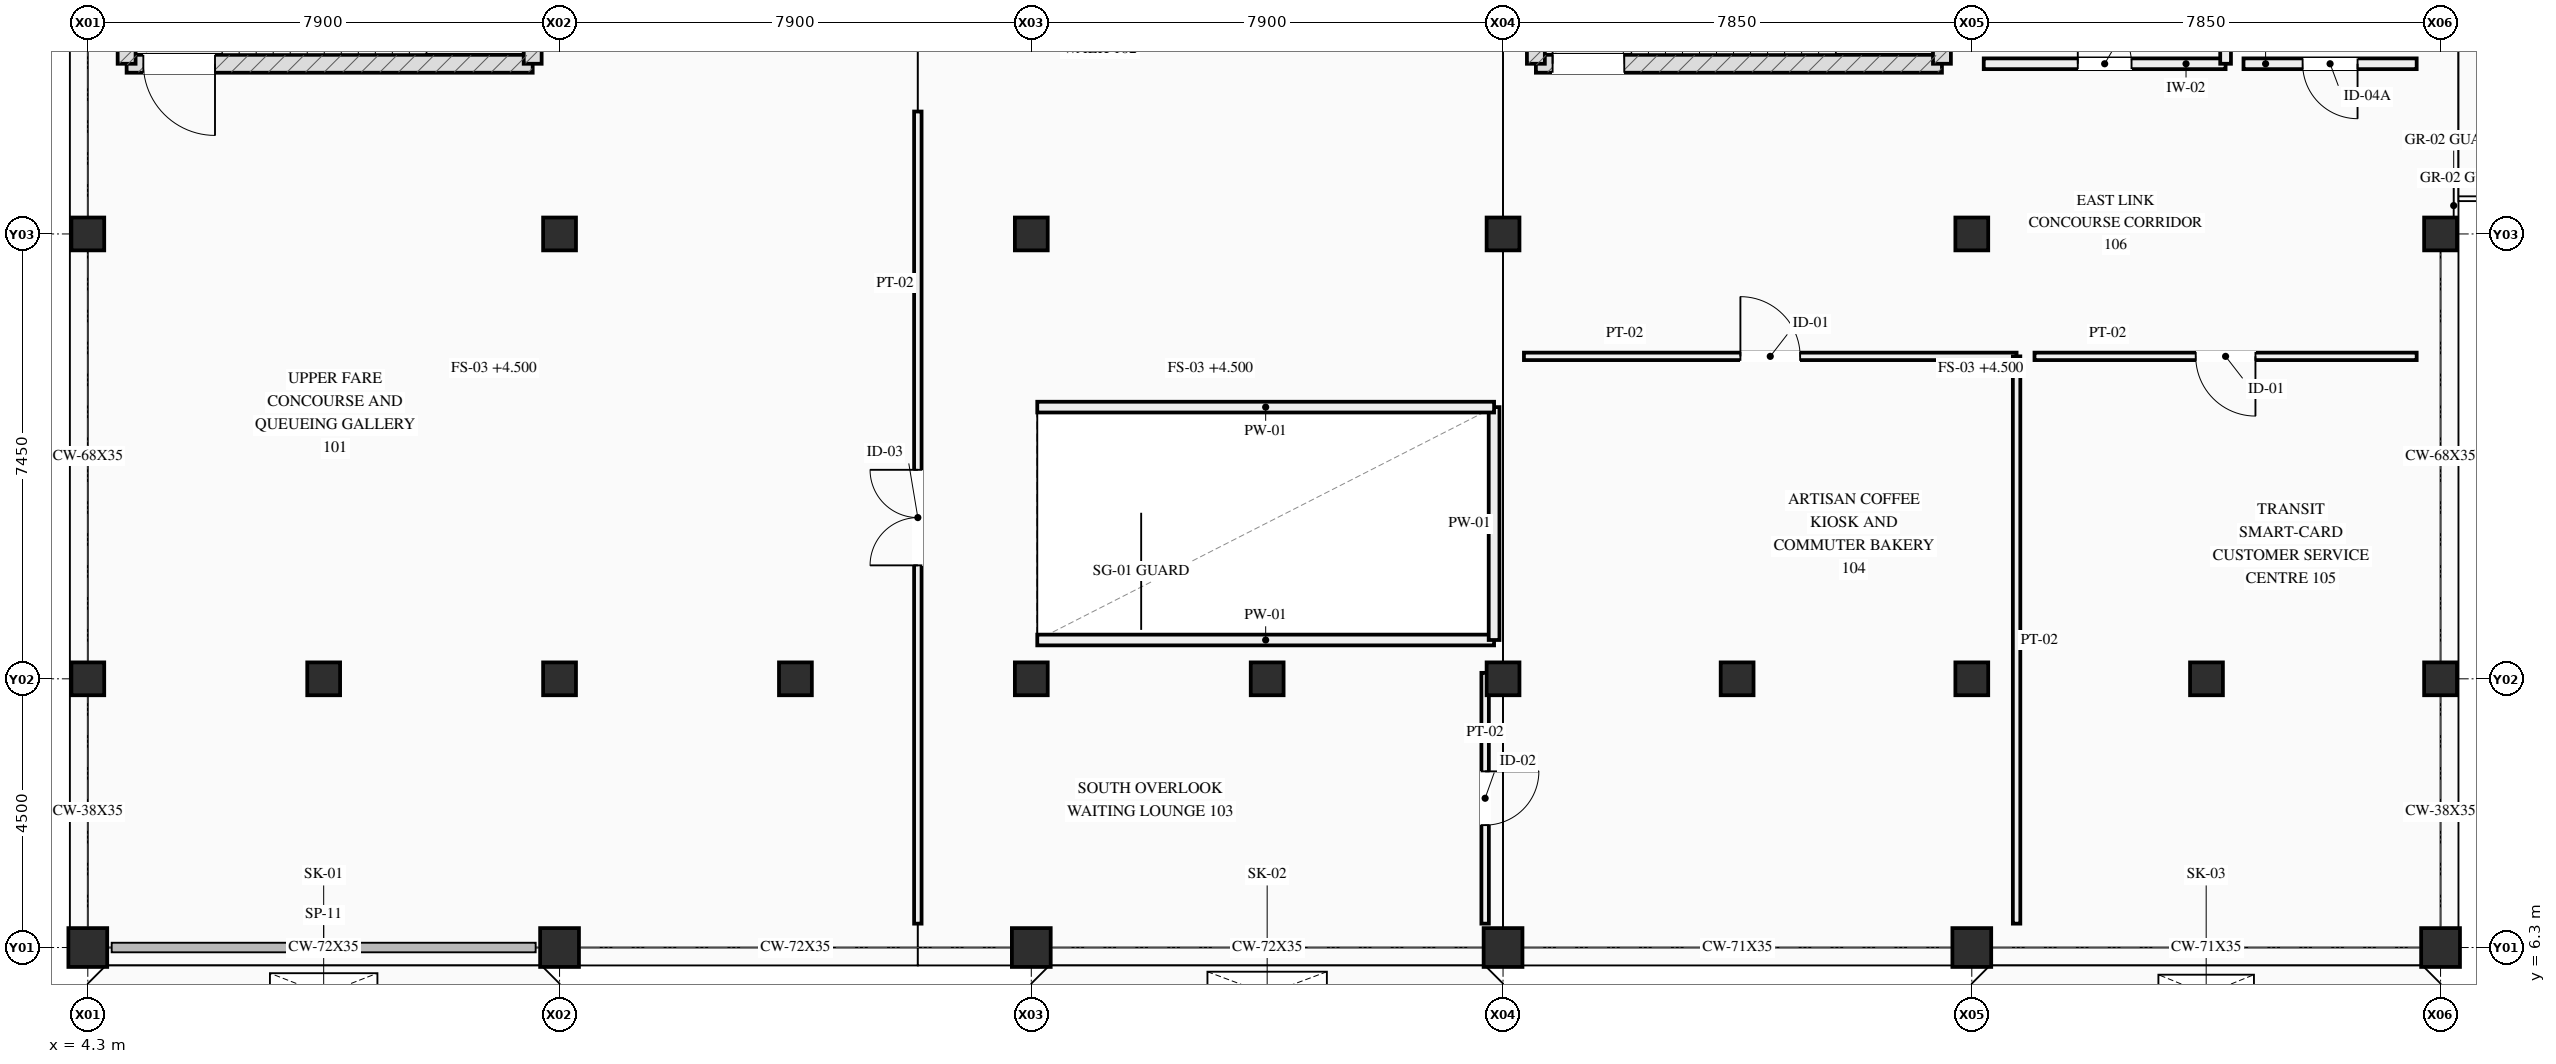
"""IFC4 building model, lengths in metres.
Left out: names, types, materials, properties, quantities, classifications, styles, units other than length and angle.
Written with IfcOpenShell. Run it as: python <this file> out.ifc"""

import sys

from ifc_helpers import new_model, si_unit, direction, frame, frame_2d, origin, origin_2d, place, context, subcontext, project, spatial, rectangle, circle, extrude, element, fill, save


model = new_model("IFC4")
c1 = context("Model", 3, precision=1e-05, world=origin(), true_north=direction((0.0, 1.0)))
c2 = subcontext(c1, "Body", "Model", "MODEL_VIEW")
j1 = project(units=[si_unit("LENGTHUNIT", "METRE"), si_unit("PLANEANGLEUNIT", "RADIAN")], contexts=[c1])
p1 = place(None, origin())
s1 = spatial("IfcSite", under=j1, at=p1, CompositionType="ELEMENT")
p2 = place(p1, origin())
s2 = spatial("IfcBuilding", under=s1, at=p2, CompositionType="ELEMENT")
p3 = place(p2, frame((0.0, 0.0, 4.5)))
s3 = spatial("IfcBuildingStorey", under=s2, at=p3, CompositionType="ELEMENT", Elevation=4.5)
p4 = place(p3, frame((4.3, 6.3, 0.0), z_axis=(0.0, 0.0, 1.0), x_axis=(1.0, 0.0, 0.0)))
e1 = element("IfcColumn", 1, at=p4, inside=s3, PredefinedType="COLUMN", context=c2, shape_type="SweptSolid", body=[
    extrude(circle(Radius=0.325, at=origin_2d()), origin(), (0.0, 0.0, 1.0), 4.5),
])
for number, where, z_axis, x_axis in (
    (2, (4.3, 10.8, 0.0), (0.0, 0.0, 1.0), (1.0, 0.0, 0.0)),
    (3, (4.3, 18.25, 0.0), (0.0, 0.0, 1.0), (1.0, 0.0, 0.0)),
):
    element("IfcColumn", number, at=place(p3, frame(where, z_axis=z_axis, x_axis=x_axis)), inside=s3, PredefinedType="COLUMN", context=c2, shape_type="SweptSolid", body=[
        extrude(rectangle(XDim=0.55, YDim=0.55, at=origin_2d()), origin(), (0.0, 0.0, 1.0), 4.5),
    ])
p5 = place(p3, frame((12.2, 6.3, 0.0), z_axis=(0.0, 0.0, 1.0), x_axis=(1.0, 0.0, 0.0)))
e4 = element("IfcColumn", 4, at=p5, inside=s3, PredefinedType="COLUMN", context=c2, shape_type="SweptSolid", body=[
    extrude(circle(Radius=0.325, at=origin_2d()), origin(), (0.0, 0.0, 1.0), 4.5),
])
for number, where, z_axis, x_axis in (
    (5, (12.2, 10.8, 0.0), (0.0, 0.0, 1.0), (1.0, 0.0, 0.0)),
    (6, (12.2, 18.25, 0.0), (0.0, 0.0, 1.0), (1.0, 0.0, 0.0)),
):
    element("IfcColumn", number, at=place(p3, frame(where, z_axis=z_axis, x_axis=x_axis)), inside=s3, PredefinedType="COLUMN", context=c2, shape_type="SweptSolid", body=[
        extrude(rectangle(XDim=0.55, YDim=0.55, at=origin_2d()), origin(), (0.0, 0.0, 1.0), 4.5),
    ])
p6 = place(p3, frame((20.1, 6.3, 0.0), z_axis=(0.0, 0.0, 1.0), x_axis=(1.0, 0.0, 0.0)))
e7 = element("IfcColumn", 7, at=p6, inside=s3, PredefinedType="COLUMN", context=c2, shape_type="SweptSolid", body=[
    extrude(circle(Radius=0.325, at=origin_2d()), origin(), (0.0, 0.0, 1.0), 4.5),
])
for number, where, z_axis, x_axis in (
    (8, (20.1, 10.8, 0.0), (0.0, 0.0, 1.0), (1.0, 0.0, 0.0)),
    (9, (20.1, 18.25, 0.0), (0.0, 0.0, 1.0), (1.0, 0.0, 0.0)),
):
    element("IfcColumn", number, at=place(p3, frame(where, z_axis=z_axis, x_axis=x_axis)), inside=s3, PredefinedType="COLUMN", context=c2, shape_type="SweptSolid", body=[
        extrude(rectangle(XDim=0.55, YDim=0.55, at=origin_2d()), origin(), (0.0, 0.0, 1.0), 4.5),
    ])
p7 = place(p3, frame((28.0, 6.3, 0.0), z_axis=(0.0, 0.0, 1.0), x_axis=(1.0, 0.0, 0.0)))
e10 = element("IfcColumn", 10, at=p7, inside=s3, PredefinedType="COLUMN", context=c2, shape_type="SweptSolid", body=[
    extrude(circle(Radius=0.325, at=origin_2d()), origin(), (0.0, 0.0, 1.0), 4.5),
])
for number, where, z_axis, x_axis in (
    (11, (28.0, 10.8, 0.0), (0.0, 0.0, 1.0), (1.0, 0.0, 0.0)),
    (12, (28.0, 18.25, 0.0), (0.0, 0.0, 1.0), (1.0, 0.0, 0.0)),
):
    element("IfcColumn", number, at=place(p3, frame(where, z_axis=z_axis, x_axis=x_axis)), inside=s3, PredefinedType="COLUMN", context=c2, shape_type="SweptSolid", body=[
        extrude(rectangle(XDim=0.55, YDim=0.55, at=origin_2d()), origin(), (0.0, 0.0, 1.0), 4.5),
    ])
p8 = place(p3, frame((35.85, 6.3, 0.0), z_axis=(0.0, 0.0, 1.0), x_axis=(1.0, 0.0, 0.0)))
e13 = element("IfcColumn", 13, at=p8, inside=s3, PredefinedType="COLUMN", context=c2, shape_type="SweptSolid", body=[
    extrude(circle(Radius=0.325, at=origin_2d()), origin(), (0.0, 0.0, 1.0), 4.5),
])
for number, where, z_axis, x_axis in (
    (14, (35.85, 10.8, 0.0), (0.0, 0.0, 1.0), (1.0, 0.0, 0.0)),
    (15, (35.85, 18.25, 0.0), (0.0, 0.0, 1.0), (1.0, 0.0, 0.0)),
):
    element("IfcColumn", number, at=place(p3, frame(where, z_axis=z_axis, x_axis=x_axis)), inside=s3, PredefinedType="COLUMN", context=c2, shape_type="SweptSolid", body=[
        extrude(rectangle(XDim=0.55, YDim=0.55, at=origin_2d()), origin(), (0.0, 0.0, 1.0), 4.5),
    ])
p9 = place(p3, frame((43.7, 6.3, 0.0), z_axis=(0.0, 0.0, 1.0), x_axis=(1.0, 0.0, 0.0)))
e16 = element("IfcColumn", 16, at=p9, inside=s3, PredefinedType="COLUMN", context=c2, shape_type="SweptSolid", body=[
    extrude(circle(Radius=0.325, at=origin_2d()), origin(), (0.0, 0.0, 1.0), 4.5),
])
for number, where, z_axis, x_axis in (
    (17, (43.7, 10.8, 0.0), (0.0, 0.0, 1.0), (1.0, 0.0, 0.0)),
    (18, (43.7, 18.25, 0.0), (0.0, 0.0, 1.0), (1.0, 0.0, 0.0)),
):
    element("IfcColumn", number, at=place(p3, frame(where, z_axis=z_axis, x_axis=x_axis)), inside=s3, PredefinedType="COLUMN", context=c2, shape_type="SweptSolid", body=[
        extrude(rectangle(XDim=0.55, YDim=0.55, at=origin_2d()), origin(), (0.0, 0.0, 1.0), 4.5),
    ])
for number, where, z_axis, x_axis in (
    (19, (8.25, 10.8, 0.0), (0.0, 0.0, 1.0), (1.0, 0.0, 0.0)),
    (20, (16.15, 10.8, 0.0), (0.0, 0.0, 1.0), (1.0, 0.0, 0.0)),
    (21, (24.05, 10.8, 0.0), (0.0, 0.0, 1.0), (1.0, 0.0, 0.0)),
    (22, (31.92, 10.8, 0.0), (0.0, 0.0, 1.0), (1.0, 0.0, 0.0)),
    (23, (39.78, 10.8, 0.0), (0.0, 0.0, 1.0), (1.0, 0.0, 0.0)),
):
    element("IfcColumn", number, at=place(p3, frame(where, z_axis=z_axis, x_axis=x_axis)), inside=s3, PredefinedType="PILASTER", context=c2, shape_type="SweptSolid", body=[
        extrude(circle(Radius=0.275, at=origin_2d()), origin(), (0.0, 0.0, 1.0), 4.5),
    ])
p10 = place(p3, frame((4.95, 21.1, 0.0), z_axis=(0.0, 0.0, 1.0), x_axis=(1.0, 0.0, 0.0)))
e24 = element("IfcWall", 24, at=p10, inside=s3, PredefinedType="SHEAR", context=c2, shape_type="SweptSolid", body=[
    extrude(rectangle(XDim=6.8, YDim=0.3, at=frame_2d((3.4, 0.0))), origin(), (0.0, 0.0, 1.0), 4.25),
])
p11 = place(p10, frame((0.28, 0.0, 0.0)))
e25 = element("IfcOpeningElement", 25, at=p11, cuts=e24, PredefinedType="OPENING", context=c2, shape_type="SweptSolid", body=[
    extrude(rectangle(XDim=1.2, YDim=2.2, at=frame_2d((0.6, 1.1))), frame((0.0, 0.16, 0.0), z_axis=(0.0, -1.0, 0.0), x_axis=(1.0, 0.0, 0.0)), (0.0, 0.0, 1.0), 0.32),
])
for number, where, z_axis, x_axis in (
    (26, (4.95, 24.75, 0.0), (0.0, 0.0, 1.0), (0.0, -1.0, 0.0)),
    (27, (11.75, 21.1, 0.0), (0.0, 0.0, 1.0), (0.0, 1.0, 0.0)),
):
    element("IfcWall", number, at=place(p3, frame(where, z_axis=z_axis, x_axis=x_axis)), inside=s3, PredefinedType="SHEAR", context=c2, shape_type="SweptSolid", body=[
        extrude(rectangle(XDim=3.65, YDim=0.3, at=frame_2d((1.825, 0.0))), origin(), (0.0, 0.0, 1.0), 4.25),
    ])
p12 = place(p3, frame((28.55, 21.1, 0.0), z_axis=(0.0, 0.0, 1.0), x_axis=(1.0, 0.0, 0.0)))
e28 = element("IfcWall", 28, at=p12, inside=s3, PredefinedType="SHEAR", context=c2, shape_type="SweptSolid", body=[
    extrude(rectangle(XDim=6.8, YDim=0.3, at=frame_2d((3.4, 0.0))), origin(), (0.0, 0.0, 1.0), 4.25),
])
p13 = place(p12, frame((0.28, 0.0, 0.0)))
e29 = element("IfcOpeningElement", 29, at=p13, cuts=e28, PredefinedType="OPENING", context=c2, shape_type="SweptSolid", body=[
    extrude(rectangle(XDim=1.2, YDim=2.2, at=frame_2d((0.6, 1.1))), frame((0.0, 0.16, 0.0), z_axis=(0.0, -1.0, 0.0), x_axis=(1.0, 0.0, 0.0)), (0.0, 0.0, 1.0), 0.32),
])
for number, where, z_axis, x_axis in (
    (30, (28.55, 24.75, 0.0), (0.0, 0.0, 1.0), (0.0, -1.0, 0.0)),
    (31, (35.35, 21.1, 0.0), (0.0, 0.0, 1.0), (0.0, 1.0, 0.0)),
):
    element("IfcWall", number, at=place(p3, frame(where, z_axis=z_axis, x_axis=x_axis)), inside=s3, PredefinedType="SHEAR", context=c2, shape_type="SweptSolid", body=[
        extrude(rectangle(XDim=3.65, YDim=0.3, at=frame_2d((1.825, 0.0))), origin(), (0.0, 0.0, 1.0), 4.25),
    ])
p14 = place(p3, frame((20.2, 11.45, 0.0), z_axis=(0.0, 0.0, 1.0), x_axis=(1.0, 0.0, 0.0)))
e32 = element("IfcWall", 32, at=p14, inside=s3, PredefinedType="PARAPET", context=c2, shape_type="SweptSolid", body=[
    extrude(rectangle(XDim=7.65, YDim=0.18, at=frame_2d((3.825, 0.0))), origin(), (0.0, 0.0, 1.0), 1.2),
])
p15 = place(p3, frame((27.85, 11.45, 0.0), z_axis=(0.0, 0.0, 1.0), x_axis=(0.0, 1.0, 0.0)))
e33 = element("IfcWall", 33, at=p15, inside=s3, PredefinedType="PARAPET", context=c2, shape_type="SweptSolid", body=[
    extrude(rectangle(XDim=3.9, YDim=0.18, at=frame_2d((1.95, 0.0))), origin(), (0.0, 0.0, 1.0), 1.2),
])
p16 = place(p3, frame((20.2, 15.35, 0.0), z_axis=(0.0, 0.0, 1.0), x_axis=(1.0, 0.0, 0.0)))
e34 = element("IfcWall", 34, at=p16, inside=s3, PredefinedType="PARAPET", context=c2, shape_type="SweptSolid", body=[
    extrude(rectangle(XDim=7.65, YDim=0.18, at=frame_2d((3.825, 0.0))), origin(), (0.0, 0.0, 1.0), 1.2),
])
p17 = place(p3, frame((18.2, 6.7, 0.0), z_axis=(0.0, 0.0, 1.0), x_axis=(0.0, 1.0, 0.0)))
e35 = element("IfcWall", 35, at=p17, inside=s3, PredefinedType="PARTITIONING", context=c2, shape_type="SweptSolid", body=[
    extrude(rectangle(XDim=13.6, YDim=0.125, at=frame_2d((6.8, 0.0))), origin(), (0.0, 0.0, 1.0), 3.3),
])
p18 = place(p17, frame((6.0, 0.0, 0.0)))
e36 = element("IfcOpeningElement", 36, at=p18, cuts=e35, PredefinedType="OPENING", context=c2, shape_type="SweptSolid", body=[
    extrude(rectangle(XDim=1.6, YDim=2.2, at=frame_2d((0.8, 1.1))), frame((0.0, 0.073, 0.0), z_axis=(0.0, -1.0, 0.0), x_axis=(1.0, 0.0, 0.0)), (0.0, 0.0, 1.0), 0.145),
])
p19 = place(p3, frame((27.7, 6.7, 0.0), z_axis=(0.0, 0.0, 1.0), x_axis=(0.0, 1.0, 0.0)))
e37 = element("IfcWall", 37, at=p19, inside=s3, PredefinedType="PARTITIONING", context=c2, shape_type="SweptSolid", body=[
    extrude(rectangle(XDim=4.2, YDim=0.125, at=frame_2d((2.1, 0.0))), origin(), (0.0, 0.0, 1.0), 3.3),
])
p20 = place(p19, frame((1.65, 0.0, 0.0)))
e38 = element("IfcOpeningElement", 38, at=p20, cuts=e37, PredefinedType="OPENING", context=c2, shape_type="SweptSolid", body=[
    extrude(rectangle(XDim=0.9, YDim=2.15, at=frame_2d((0.45, 1.075))), frame((0.0, 0.073, 0.0), z_axis=(0.0, -1.0, 0.0), x_axis=(1.0, 0.0, 0.0)), (0.0, 0.0, 1.0), 0.145),
])
p21 = place(p3, frame((28.35, 16.2, 0.0), z_axis=(0.0, 0.0, 1.0), x_axis=(1.0, 0.0, 0.0)))
e39 = element("IfcWall", 39, at=p21, inside=s3, PredefinedType="PARTITIONING", context=c2, shape_type="SweptSolid", body=[
    extrude(rectangle(XDim=8.25, YDim=0.125, at=frame_2d((4.125, 0.0))), origin(), (0.0, 0.0, 1.0), 3.3),
])
p22 = place(p21, frame((3.625, 0.0, 0.0)))
e40 = element("IfcOpeningElement", 40, at=p22, cuts=e39, PredefinedType="OPENING", context=c2, shape_type="SweptSolid", body=[
    extrude(rectangle(XDim=1.0, YDim=2.15, at=frame_2d((0.5, 1.075))), frame((0.0, 0.073, 0.0), z_axis=(0.0, -1.0, 0.0), x_axis=(1.0, 0.0, 0.0)), (0.0, 0.0, 1.0), 0.145),
])
p23 = place(p3, frame((36.6, 6.7, 0.0), z_axis=(0.0, 0.0, 1.0), x_axis=(0.0, 1.0, 0.0)))
e41 = element("IfcWall", 41, at=p23, inside=s3, PredefinedType="PARTITIONING", context=c2, shape_type="SweptSolid", body=[
    extrude(rectangle(XDim=9.5, YDim=0.125, at=frame_2d((4.75, 0.0))), origin(), (0.0, 0.0, 1.0), 3.3),
])
p24 = place(p3, frame((36.9, 16.2, 0.0), z_axis=(0.0, 0.0, 1.0), x_axis=(1.0, 0.0, 0.0)))
e42 = element("IfcWall", 42, at=p24, inside=s3, PredefinedType="PARTITIONING", context=c2, shape_type="SweptSolid", body=[
    extrude(rectangle(XDim=6.4, YDim=0.125, at=frame_2d((3.2, 0.0))), origin(), (0.0, 0.0, 1.0), 3.3),
])
p25 = place(p24, frame((2.7, 0.0, 0.0)))
e43 = element("IfcOpeningElement", 43, at=p25, cuts=e42, PredefinedType="OPENING", context=c2, shape_type="SweptSolid", body=[
    extrude(rectangle(XDim=1.0, YDim=2.15, at=frame_2d((0.5, 1.075))), frame((0.0, 0.073, 0.0), z_axis=(0.0, -1.0, 0.0), x_axis=(1.0, 0.0, 0.0)), (0.0, 0.0, 1.0), 0.145),
])
p26 = place(p3, frame((36.05, 21.1, 0.0), z_axis=(0.0, 0.0, 1.0), x_axis=(1.0, 0.0, 0.0)))
e44 = element("IfcWall", 44, at=p26, inside=s3, PredefinedType="PLUMBINGWALL", context=c2, shape_type="SweptSolid", body=[
    extrude(rectangle(XDim=4.05, YDim=0.18, at=frame_2d((2.025, 0.0))), origin(), (0.0, 0.0, 1.0), 3.3),
])
p27 = place(p26, frame((1.575, 0.0, 0.0)))
e45 = element("IfcOpeningElement", 45, at=p27, cuts=e44, PredefinedType="OPENING", context=c2, shape_type="SweptSolid", body=[
    extrude(rectangle(XDim=0.9, YDim=2.1, at=frame_2d((0.45, 1.05))), frame((0.0, 0.1, 0.0), z_axis=(0.0, -1.0, 0.0), x_axis=(1.0, 0.0, 0.0)), (0.0, 0.0, 1.0), 0.2),
])
p28 = place(p3, frame((40.1, 21.1, 0.0), z_axis=(0.0, 0.0, 1.0), x_axis=(0.0, 1.0, 0.0)))
e46 = element("IfcWall", 46, at=p28, inside=s3, PredefinedType="PLUMBINGWALL", context=c2, shape_type="SweptSolid", body=[
    extrude(rectangle(XDim=4.25, YDim=0.18, at=frame_2d((2.125, 0.0))), origin(), (0.0, 0.0, 1.0), 3.3),
])
p29 = place(p3, frame((40.4, 21.1, 0.0), z_axis=(0.0, 0.0, 1.0), x_axis=(1.0, 0.0, 0.0)))
e47 = element("IfcWall", 47, at=p29, inside=s3, PredefinedType="PLUMBINGWALL", context=c2, shape_type="SweptSolid", body=[
    extrude(rectangle(XDim=2.9, YDim=0.18, at=frame_2d((1.45, 0.0))), origin(), (0.0, 0.0, 1.0), 3.3),
])
p30 = place(p29, frame((0.99, 0.0, 0.0)))
e48 = element("IfcOpeningElement", 48, at=p30, cuts=e47, PredefinedType="OPENING", context=c2, shape_type="SweptSolid", body=[
    extrude(rectangle(XDim=0.92, YDim=2.1, at=frame_2d((0.46, 1.05))), frame((0.0, 0.1, 0.0), z_axis=(0.0, -1.0, 0.0), x_axis=(1.0, 0.0, 0.0)), (0.0, 0.0, 1.0), 0.2),
])
p31 = place(p3, frame((0.0, 0.0, -0.15)))
p32 = place(p31, frame((8.25, 5.52, 0.0)))
p33 = place(p32, frame((0.0, 0.0, 0.1)))
e49 = element("IfcWindow", 49, at=p33, inside=s3, PartitioningType="SINGLE_PANEL", PredefinedType="SKYLIGHT", context=c2, shape_type="SweptSolid", body=[
    extrude(rectangle(XDim=1.8, YDim=0.7, at=origin_2d()), origin(), (0.0, 0.0, 1.0), 0.05),
])
p34 = place(p3, frame((0.0, 0.0, -0.15)))
p35 = place(p34, frame((24.05, 5.52, 0.0)))
p36 = place(p35, frame((0.0, 0.0, 0.1)))
e50 = element("IfcWindow", 50, at=p36, inside=s3, PartitioningType="SINGLE_PANEL", PredefinedType="SKYLIGHT", context=c2, shape_type="SweptSolid", body=[
    extrude(rectangle(XDim=2.0, YDim=0.75, at=origin_2d()), origin(), (0.0, 0.0, 1.0), 0.05),
])
p37 = place(p3, frame((0.0, 0.0, -0.15)))
p38 = place(p37, frame((39.775, 5.52, 0.0)))
p39 = place(p38, frame((0.0, 0.0, 0.1)))
e51 = element("IfcWindow", 51, at=p39, inside=s3, PartitioningType="SINGLE_PANEL", PredefinedType="SKYLIGHT", context=c2, shape_type="SweptSolid", body=[
    extrude(rectangle(XDim=1.6, YDim=0.65, at=origin_2d()), origin(), (0.0, 0.0, 1.0), 0.05),
])
p40 = place(p11, origin())
e52 = element("IfcDoor", 52, at=p40, inside=s3, OperationType="SINGLE_SWING_RIGHT", PredefinedType="DOOR", context=c2, shape_type="SweptSolid", body=[
    extrude(rectangle(XDim=1.2, YDim=2.2, at=frame_2d((0.6, 1.1))), frame((0.0, 0.025, 0.0), z_axis=(0.0, -1.0, 0.0), x_axis=(1.0, 0.0, 0.0)), (0.0, 0.0, 1.0), 0.05),
])
fill(e25, e52)
p41 = place(p13, origin())
e53 = element("IfcDoor", 53, at=p41, inside=s3, OperationType="SINGLE_SWING_LEFT", PredefinedType="DOOR", context=c2, shape_type="SweptSolid", body=[
    extrude(rectangle(XDim=1.2, YDim=2.2, at=frame_2d((0.6, 1.1))), frame((0.0, 0.025, 0.0), z_axis=(0.0, -1.0, 0.0), x_axis=(1.0, 0.0, 0.0)), (0.0, 0.0, 1.0), 0.05),
])
fill(e29, e53)
p42 = place(p18, origin())
e54 = element("IfcDoor", 54, at=p42, inside=s3, OperationType="DOUBLE_DOOR_SINGLE_SWING", PredefinedType="DOOR", context=c2, shape_type="SweptSolid", body=[
    extrude(rectangle(XDim=1.6, YDim=2.2, at=frame_2d((0.8, 1.1))), frame((0.0, 0.025, 0.0), z_axis=(0.0, -1.0, 0.0), x_axis=(1.0, 0.0, 0.0)), (0.0, 0.0, 1.0), 0.05),
])
fill(e36, e54)
p43 = place(p20, origin())
e55 = element("IfcDoor", 55, at=p43, inside=s3, OperationType="SINGLE_SWING_RIGHT", PredefinedType="DOOR", context=c2, shape_type="SweptSolid", body=[
    extrude(rectangle(XDim=0.9, YDim=2.15, at=frame_2d((0.45, 1.075))), frame((0.0, 0.025, 0.0), z_axis=(0.0, -1.0, 0.0), x_axis=(1.0, 0.0, 0.0)), (0.0, 0.0, 1.0), 0.05),
])
fill(e38, e55)
p44 = place(p22, origin())
e56 = element("IfcDoor", 56, at=p44, inside=s3, OperationType="SINGLE_SWING_LEFT", PredefinedType="DOOR", context=c2, shape_type="SweptSolid", body=[
    extrude(rectangle(XDim=1.0, YDim=2.15, at=frame_2d((0.5, 1.075))), frame((0.0, 0.025, 0.0), z_axis=(0.0, -1.0, 0.0), x_axis=(1.0, 0.0, 0.0)), (0.0, 0.0, 1.0), 0.05),
])
fill(e40, e56)
p45 = place(p25, origin())
e57 = element("IfcDoor", 57, at=p45, inside=s3, OperationType="SINGLE_SWING_RIGHT", PredefinedType="DOOR", context=c2, shape_type="SweptSolid", body=[
    extrude(rectangle(XDim=1.0, YDim=2.15, at=frame_2d((0.5, 1.075))), frame((0.0, 0.025, 0.0), z_axis=(0.0, -1.0, 0.0), x_axis=(1.0, 0.0, 0.0)), (0.0, 0.0, 1.0), 0.05),
])
fill(e43, e57)
p46 = place(p27, origin())
e58 = element("IfcDoor", 58, at=p46, inside=s3, OperationType="SINGLE_SWING_LEFT", PredefinedType="DOOR", context=c2, shape_type="SweptSolid", body=[
    extrude(rectangle(XDim=0.9, YDim=2.1, at=frame_2d((0.45, 1.05))), frame((0.0, 0.025, 0.0), z_axis=(0.0, -1.0, 0.0), x_axis=(1.0, 0.0, 0.0)), (0.0, 0.0, 1.0), 0.05),
])
fill(e45, e58)
p47 = place(p30, origin())
e59 = element("IfcDoor", 59, at=p47, inside=s3, OperationType="SINGLE_SWING_RIGHT", PredefinedType="DOOR", context=c2, shape_type="SweptSolid", body=[
    extrude(rectangle(XDim=0.92, YDim=2.1, at=frame_2d((0.46, 1.05))), frame((0.0, 0.025, 0.0), z_axis=(0.0, -1.0, 0.0), x_axis=(1.0, 0.0, 0.0)), (0.0, 0.0, 1.0), 0.05),
])
fill(e48, e59)
save(model, sys.argv[1])
